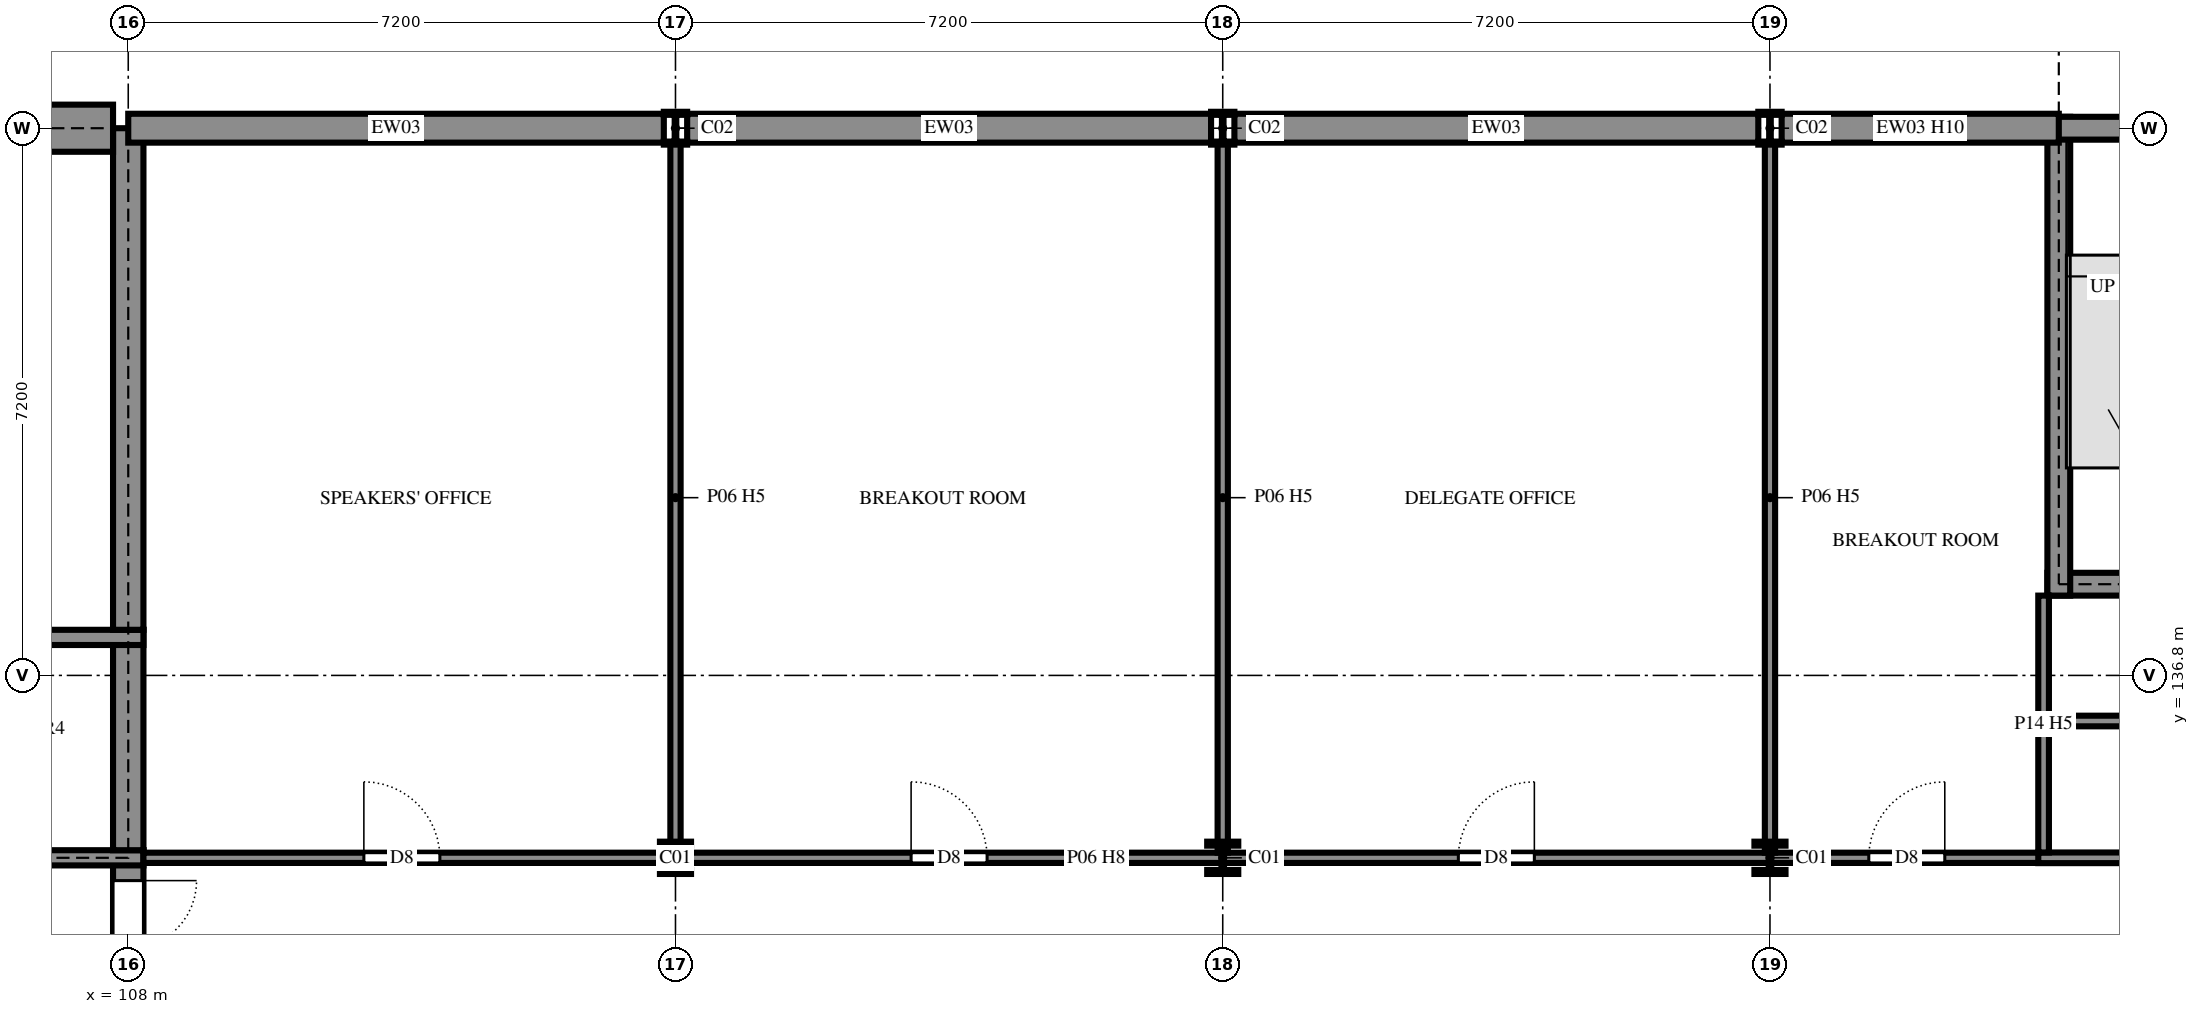
"""IFC4 building model, lengths in metres.
Left out: names, types, materials, properties, quantities, classifications, styles, units other than length and angle.
Written with IfcOpenShell. Run it as: python <this file> out.ifc"""

import sys

from ifc_helpers import new_model, si_unit, direction, frame, frame_2d, origin, origin_2d, place, context, subcontext, project, spatial, rectangle, i_section, extrude, element, fill, save


model = new_model("IFC4")
c1 = context("Model", 3, precision=1e-05, world=origin(), true_north=direction((0.0, 1.0)))
c2 = subcontext(c1, "Body", "Model", "MODEL_VIEW")
j1 = project(units=[si_unit("LENGTHUNIT", "METRE"), si_unit("PLANEANGLEUNIT", "RADIAN")], contexts=[c1])
p1 = place(None, origin())
s1 = spatial("IfcSite", under=j1, at=p1, CompositionType="ELEMENT")
p2 = place(p1, origin())
s2 = spatial("IfcBuilding", under=s1, at=p2, CompositionType="ELEMENT")
p3 = place(p2, frame((0.0, 0.0, 14.4)))
s3 = spatial("IfcBuildingStorey", under=s2, at=p3, CompositionType="ELEMENT", Elevation=14.4)
p4 = place(p3, frame((115.2, 134.4, 0.0), z_axis=(0.0, 0.0, 1.0), x_axis=(1.0, 0.0, 0.0)))
e1 = element("IfcColumn", 1, at=p4, inside=s3, PredefinedType="COLUMN", context=c2, shape_type="SweptSolid", body=[
    extrude(i_section(OverallWidth=0.409, OverallDepth=0.425, WebThickness=0.033, FlangeThickness=0.052, FilletRadius=0.015, at=origin_2d()), origin(), (0.0, 0.0, 1.0), 3.6),
])
p5 = place(p3, frame((115.2, 144.0, 0.0), z_axis=(0.0, 0.0, 1.0), x_axis=(1.0, 0.0, 0.0)))
e2 = element("IfcColumn", 2, at=p5, inside=s3, PredefinedType="COLUMN", context=c2, shape_type="SweptSolid", body=[
    extrude(i_section(OverallWidth=0.307, OverallDepth=0.432, WebThickness=0.021, FlangeThickness=0.04, FilletRadius=0.027, at=origin_2d()), origin(), (0.0, 0.0, 1.0), 3.6),
])
p6 = place(p3, frame((122.4, 134.4, 0.0), z_axis=(0.0, 0.0, 1.0), x_axis=(1.0, 0.0, 0.0)))
e3 = element("IfcColumn", 3, at=p6, inside=s3, PredefinedType="COLUMN", context=c2, shape_type="SweptSolid", body=[
    extrude(i_section(OverallWidth=0.409, OverallDepth=0.425, WebThickness=0.033, FlangeThickness=0.052, FilletRadius=0.015, at=origin_2d()), origin(), (0.0, 0.0, 1.0), 3.6),
])
p7 = place(p3, frame((122.4, 144.0, 0.0), z_axis=(0.0, 0.0, 1.0), x_axis=(1.0, 0.0, 0.0)))
e4 = element("IfcColumn", 4, at=p7, inside=s3, PredefinedType="COLUMN", context=c2, shape_type="SweptSolid", body=[
    extrude(i_section(OverallWidth=0.307, OverallDepth=0.432, WebThickness=0.021, FlangeThickness=0.04, FilletRadius=0.027, at=origin_2d()), origin(), (0.0, 0.0, 1.0), 3.6),
])
p8 = place(p3, frame((129.6, 134.4, 0.0), z_axis=(0.0, 0.0, 1.0), x_axis=(1.0, 0.0, 0.0)))
e5 = element("IfcColumn", 5, at=p8, inside=s3, PredefinedType="COLUMN", context=c2, shape_type="SweptSolid", body=[
    extrude(i_section(OverallWidth=0.409, OverallDepth=0.425, WebThickness=0.033, FlangeThickness=0.052, FilletRadius=0.015, at=origin_2d()), origin(), (0.0, 0.0, 1.0), 3.6),
])
p9 = place(p3, frame((129.6, 144.0, 0.0), z_axis=(0.0, 0.0, 1.0), x_axis=(1.0, 0.0, 0.0)))
e6 = element("IfcColumn", 6, at=p9, inside=s3, PredefinedType="COLUMN", context=c2, shape_type="SweptSolid", body=[
    extrude(i_section(OverallWidth=0.307, OverallDepth=0.432, WebThickness=0.021, FlangeThickness=0.04, FilletRadius=0.027, at=origin_2d()), origin(), (0.0, 0.0, 1.0), 3.6),
])
p10 = place(p3, frame((108.0, 132.0, 0.0), z_axis=(0.0, 0.0, 1.0), x_axis=(0.0, 1.0, 0.0)))
e7 = element("IfcWall", 7, at=p10, inside=s3, PredefinedType="SHEAR", context=c2, shape_type="SweptSolid", body=[
    extrude(rectangle(XDim=2.5, YDim=0.4, at=frame_2d((1.25, 0.0))), origin(), (0.0, 0.0, 1.0), 3.6),
])
p11 = place(p10, frame((0.3, 0.0, 0.0)))
e8 = element("IfcOpeningElement", 8, at=p11, cuts=e7, PredefinedType="OPENING", context=c2, shape_type="SweptSolid", body=[
    extrude(rectangle(XDim=1.8, YDim=2.1, at=frame_2d((0.9, 1.05))), frame((0.0, 0.21, 0.0), z_axis=(0.0, -1.0, 0.0), x_axis=(1.0, 0.0, 0.0)), (0.0, 0.0, 1.0), 0.42),
])
p12 = place(p3, frame((104.1, 134.4, 0.0), z_axis=(0.0, 0.0, 1.0), x_axis=(1.0, 0.0, 0.0)))
e9 = element("IfcWall", 9, at=p12, inside=s3, PredefinedType="SHEAR", context=c2, shape_type="SweptSolid", body=[
    extrude(rectangle(XDim=4.1, YDim=0.2, at=frame_2d((2.05, 0.0))), origin(), (0.0, 0.0, 1.0), 3.6),
])
p13 = place(p12, frame((1.475, 0.0, 0.0)))
e10 = element("IfcOpeningElement", 10, at=p13, cuts=e9, PredefinedType="OPENING", context=c2, shape_type="SweptSolid", body=[
    extrude(rectangle(XDim=0.85, YDim=2.1, at=frame_2d((0.425, 1.05))), frame((0.0, 0.11, 0.0), z_axis=(0.0, -1.0, 0.0), x_axis=(1.0, 0.0, 0.0)), (0.0, 0.0, 1.0), 0.22),
])
p14 = place(p3, frame((108.0, 134.5, 0.0), z_axis=(0.0, 0.0, 1.0), x_axis=(0.0, 1.0, 0.0)))
e11 = element("IfcWall", 11, at=p14, inside=s3, PredefinedType="SHEAR", context=c2, shape_type="SweptSolid", body=[
    extrude(rectangle(XDim=2.9, YDim=0.4, at=frame_2d((1.45, 0.0))), origin(), (0.0, 0.0, 1.0), 3.6),
])
p15 = place(p3, frame((108.2, 137.3, 0.0), z_axis=(0.0, 0.0, 1.0), x_axis=(-1.0, 0.0, 0.0)))
e12 = element("IfcWall", 12, at=p15, inside=s3, PredefinedType="SHEAR", context=c2, shape_type="SweptSolid", body=[
    extrude(rectangle(XDim=4.1, YDim=0.2, at=frame_2d((2.05, 0.0))), origin(), (0.0, 0.0, 1.0), 3.6),
])
p16 = place(p3, frame((108.0, 137.4, 0.0), z_axis=(0.0, 0.0, 1.0), x_axis=(0.0, 1.0, 0.0)))
e13 = element("IfcWall", 13, at=p16, inside=s3, PredefinedType="SHEAR", context=c2, shape_type="SweptSolid", body=[
    extrude(rectangle(XDim=6.6, YDim=0.4, at=frame_2d((3.3, 0.0))), origin(), (0.0, 0.0, 1.0), 3.6),
])
p17 = place(p3, frame((133.25, 138.0, 0.0), z_axis=(0.0, 0.0, 1.0), x_axis=(1.0, 0.0, 0.0)))
e14 = element("IfcWall", 14, at=p17, inside=s3, PredefinedType="SHEAR", context=c2, shape_type="SweptSolid", body=[
    extrude(rectangle(XDim=3.7, YDim=0.3, at=frame_2d((1.85, 0.0))), origin(), (0.0, 0.0, 1.0), 3.6),
])
p18 = place(p17, frame((1.25, 0.0, 0.0)))
e15 = element("IfcOpeningElement", 15, at=p18, cuts=e14, PredefinedType="OPENING", context=c2, shape_type="SweptSolid", body=[
    extrude(rectangle(XDim=1.0, YDim=2.1, at=frame_2d((0.5, 1.05))), frame((0.0, 0.16, 0.0), z_axis=(0.0, -1.0, 0.0), x_axis=(1.0, 0.0, 0.0)), (0.0, 0.0, 1.0), 0.32),
])
p19 = place(p3, frame((133.4, 144.15, 0.0), z_axis=(0.0, 0.0, 1.0), x_axis=(0.0, -1.0, 0.0)))
e16 = element("IfcWall", 16, at=p19, inside=s3, PredefinedType="SHEAR", context=c2, shape_type="SweptSolid", body=[
    extrude(rectangle(XDim=6.3, YDim=0.3, at=frame_2d((3.15, 0.0))), origin(), (0.0, 0.0, 1.0), 3.6),
])
p20 = place(p3, frame((136.95, 144.0, 0.0), z_axis=(0.0, 0.0, 1.0), x_axis=(-1.0, 0.0, 0.0)))
e17 = element("IfcWall", 17, at=p20, inside=s3, PredefinedType="SHEAR", context=c2, shape_type="SweptSolid", body=[
    extrude(rectangle(XDim=3.7, YDim=0.3, at=frame_2d((1.85, 0.0))), origin(), (0.0, 0.0, 1.0), 3.6),
])
p21 = place(p20, frame((1.25, 0.0, 0.6)))
e18 = element("IfcOpeningElement", 18, at=p21, cuts=e17, PredefinedType="OPENING", context=c2, shape_type="SweptSolid", body=[
    extrude(rectangle(XDim=0.9, YDim=2.1, at=frame_2d((0.45, 1.05))), frame((0.0, 0.16, 0.0), z_axis=(0.0, -1.0, 0.0), x_axis=(1.0, 0.0, 0.0)), (0.0, 0.0, 1.0), 0.32),
])
p22 = place(p3, frame((133.4, 144.0, 0.0), z_axis=(0.0, 0.0, 1.0), x_axis=(-1.0, 0.0, 0.0)))
e19 = element("IfcWall", 19, at=p22, inside=s3, PredefinedType="SOLIDWALL", context=c2, shape_type="SweptSolid", body=[
    extrude(rectangle(XDim=3.646, YDim=0.38, at=frame_2d((1.823, 0.0))), origin(), (0.0, 0.0, 1.0), 3.26),
])
for number, where, z_axis, x_axis in (
    (20, (129.447, 144.0, 0.0), (0.0, 0.0, 1.0), (-1.0, 0.0, 0.0)),
    (21, (122.247, 144.0, 0.0), (0.0, 0.0, 1.0), (-1.0, 0.0, 0.0)),
):
    element("IfcWall", number, at=place(p3, frame(where, z_axis=z_axis, x_axis=x_axis)), inside=s3, PredefinedType="SOLIDWALL", context=c2, shape_type="SweptSolid", body=[
        extrude(rectangle(XDim=6.893, YDim=0.38, at=frame_2d((3.447, 0.0))), origin(), (0.0, 0.0, 1.0), 3.16),
    ])
p23 = place(p3, frame((115.046, 144.0, 0.0), z_axis=(0.0, 0.0, 1.0), x_axis=(-1.0, 0.0, 0.0)))
e22 = element("IfcWall", 22, at=p23, inside=s3, PredefinedType="SOLIDWALL", context=c2, shape_type="SweptSolid", body=[
    extrude(rectangle(XDim=7.046, YDim=0.38, at=frame_2d((3.523, 0.0))), origin(), (0.0, 0.0, 1.0), 3.16),
])
p24 = place(p3, frame((107.8, 144.0, 0.0), z_axis=(0.0, 0.0, 1.0), x_axis=(-1.0, 0.0, 0.0)))
e23 = element("IfcWall", 23, at=p24, inside=s3, PredefinedType="SOLIDWALL", context=c2, shape_type="SweptSolid", body=[
    extrude(rectangle(XDim=1.2, YDim=0.62, at=frame_2d((0.6, 0.0))), origin(), (0.0, 0.0, 1.0), 3.46),
])
p25 = place(p3, frame((108.2, 134.4, 0.0), z_axis=(0.0, 0.0, 1.0), x_axis=(1.0, 0.0, 0.0)))
e24 = element("IfcWall", 24, at=p25, inside=s3, PredefinedType="PARTITIONING", context=c2, shape_type="SweptSolid", body=[
    extrude(rectangle(XDim=25.07, YDim=0.135, at=frame_2d((12.535, 0.0))), origin(), (0.0, 0.0, 1.0), 3.16),
])
p26 = place(p25, frame((2.9, 0.0, 0.0)))
e25 = element("IfcOpeningElement", 25, at=p26, cuts=e24, PredefinedType="OPENING", context=c2, shape_type="SweptSolid", body=[
    extrude(rectangle(XDim=1.0, YDim=2.4, at=frame_2d((0.5, 1.2))), frame((0.0, 0.077, 0.0), z_axis=(0.0, -1.0, 0.0), x_axis=(1.0, 0.0, 0.0)), (0.0, 0.0, 1.0), 0.155),
])
p27 = place(p25, frame((10.1, 0.0, 0.0)))
e26 = element("IfcOpeningElement", 26, at=p27, cuts=e24, PredefinedType="OPENING", context=c2, shape_type="SweptSolid", body=[
    extrude(rectangle(XDim=1.0, YDim=2.4, at=frame_2d((0.5, 1.2))), frame((0.0, 0.077, 0.0), z_axis=(0.0, -1.0, 0.0), x_axis=(1.0, 0.0, 0.0)), (0.0, 0.0, 1.0), 0.155),
])
p28 = place(p25, frame((17.3, 0.0, 0.0)))
e27 = element("IfcOpeningElement", 27, at=p28, cuts=e24, PredefinedType="OPENING", context=c2, shape_type="SweptSolid", body=[
    extrude(rectangle(XDim=1.0, YDim=2.4, at=frame_2d((0.5, 1.2))), frame((0.0, 0.077, 0.0), z_axis=(0.0, -1.0, 0.0), x_axis=(1.0, 0.0, 0.0)), (0.0, 0.0, 1.0), 0.155),
])
p29 = place(p25, frame((22.7, 0.0, 0.0)))
e28 = element("IfcOpeningElement", 28, at=p29, cuts=e24, PredefinedType="OPENING", context=c2, shape_type="SweptSolid", body=[
    extrude(rectangle(XDim=1.0, YDim=2.4, at=frame_2d((0.5, 1.2))), frame((0.0, 0.077, 0.0), z_axis=(0.0, -1.0, 0.0), x_axis=(1.0, 0.0, 0.0)), (0.0, 0.0, 1.0), 0.155),
])
p30 = place(p3, frame((133.13, 134.4, 0.0), z_axis=(0.0, 0.0, 1.0), x_axis=(1.0, 0.0, 0.0)))
e29 = element("IfcWall", 29, at=p30, inside=s3, PredefinedType="PARTITIONING", context=c2, shape_type="SweptSolid", body=[
    extrude(rectangle(XDim=3.48, YDim=0.14, at=frame_2d((1.74, 0.0))), origin(), (0.0, 0.0, 1.0), 3.16),
])
p31 = place(p30, frame((1.37, 0.0, 0.0)))
e30 = element("IfcOpeningElement", 30, at=p31, cuts=e29, PredefinedType="OPENING", context=c2, shape_type="SweptSolid", body=[
    extrude(rectangle(XDim=1.0, YDim=2.1, at=frame_2d((0.5, 1.05))), frame((0.0, 0.08, 0.0), z_axis=(0.0, -1.0, 0.0), x_axis=(1.0, 0.0, 0.0)), (0.0, 0.0, 1.0), 0.16),
])
p32 = place(p3, frame((133.27, 136.2, 0.0), z_axis=(0.0, 0.0, 1.0), x_axis=(1.0, 0.0, 0.0)))
e31 = element("IfcWall", 31, at=p32, inside=s3, PredefinedType="PARTITIONING", context=c2, shape_type="SweptSolid", body=[
    extrude(rectangle(XDim=3.34, YDim=0.14, at=frame_2d((1.67, 0.0))), origin(), (0.0, 0.0, 1.0), 3.42),
])
p33 = place(p32, frame((1.23, 0.0, 0.0)))
e32 = element("IfcOpeningElement", 32, at=p33, cuts=e31, PredefinedType="OPENING", context=c2, shape_type="SweptSolid", body=[
    extrude(rectangle(XDim=1.0, YDim=2.1, at=frame_2d((0.5, 1.05))), frame((0.0, 0.08, 0.0), z_axis=(0.0, -1.0, 0.0), x_axis=(1.0, 0.0, 0.0)), (0.0, 0.0, 1.0), 0.16),
])
for number, where, z_axis, x_axis in (
    (33, (115.2, 134.468, 0.0), (0.0, 0.0, 1.0), (0.0, 1.0, 0.0)),
    (34, (122.4, 134.468, 0.0), (0.0, 0.0, 1.0), (0.0, 1.0, 0.0)),
    (35, (129.6, 134.468, 0.0), (0.0, 0.0, 1.0), (0.0, 1.0, 0.0)),
):
    element("IfcWall", number, at=place(p3, frame(where, z_axis=z_axis, x_axis=x_axis)), inside=s3, PredefinedType="PARTITIONING", context=c2, shape_type="SweptSolid", body=[
        extrude(rectangle(XDim=9.343, YDim=0.135, at=frame_2d((4.671, 0.0))), origin(), (0.0, 0.0, 1.0), 3.06),
    ])
p34 = place(p3, frame((133.2, 134.47, 0.0), z_axis=(0.0, 0.0, 1.0), x_axis=(0.0, 1.0, 0.0)))
e36 = element("IfcWall", 36, at=p34, inside=s3, PredefinedType="PARTITIONING", context=c2, shape_type="SweptSolid", body=[
    extrude(rectangle(XDim=3.38, YDim=0.14, at=frame_2d((1.69, 0.0))), origin(), (0.0, 0.0, 1.0), 3.06),
])
p35 = place(p26, origin())
e37 = element("IfcDoor", 37, at=p35, inside=s3, OperationType="SINGLE_SWING_RIGHT", PredefinedType="DOOR", context=c2, shape_type="SweptSolid", body=[
    extrude(rectangle(XDim=1.0, YDim=2.4, at=frame_2d((0.5, 1.2))), frame((0.0, 0.025, 0.0), z_axis=(0.0, -1.0, 0.0), x_axis=(1.0, 0.0, 0.0)), (0.0, 0.0, 1.0), 0.05),
])
fill(e25, e37)
p36 = place(p27, origin())
e38 = element("IfcDoor", 38, at=p36, inside=s3, OperationType="SINGLE_SWING_RIGHT", PredefinedType="DOOR", context=c2, shape_type="SweptSolid", body=[
    extrude(rectangle(XDim=1.0, YDim=2.4, at=frame_2d((0.5, 1.2))), frame((0.0, 0.025, 0.0), z_axis=(0.0, -1.0, 0.0), x_axis=(1.0, 0.0, 0.0)), (0.0, 0.0, 1.0), 0.05),
])
fill(e26, e38)
p37 = place(p28, origin())
e39 = element("IfcDoor", 39, at=p37, inside=s3, OperationType="SINGLE_SWING_LEFT", PredefinedType="DOOR", context=c2, shape_type="SweptSolid", body=[
    extrude(rectangle(XDim=1.0, YDim=2.4, at=frame_2d((0.5, 1.2))), frame((0.0, 0.025, 0.0), z_axis=(0.0, -1.0, 0.0), x_axis=(1.0, 0.0, 0.0)), (0.0, 0.0, 1.0), 0.05),
])
fill(e27, e39)
p38 = place(p29, origin())
e40 = element("IfcDoor", 40, at=p38, inside=s3, OperationType="SINGLE_SWING_LEFT", PredefinedType="DOOR", context=c2, shape_type="SweptSolid", body=[
    extrude(rectangle(XDim=1.0, YDim=2.4, at=frame_2d((0.5, 1.2))), frame((0.0, 0.025, 0.0), z_axis=(0.0, -1.0, 0.0), x_axis=(1.0, 0.0, 0.0)), (0.0, 0.0, 1.0), 0.05),
])
fill(e28, e40)
p39 = place(p11, frame((1.8, 0.0, 0.0), z_axis=(0.0, 0.0, 1.0), x_axis=(-1.0, 0.0, 0.0)))
e41 = element("IfcDoor", 41, at=p39, inside=s3, OperationType="DOUBLE_DOOR_SINGLE_SWING", PredefinedType="DOOR", context=c2, shape_type="SweptSolid", body=[
    extrude(rectangle(XDim=1.8, YDim=2.1, at=frame_2d((0.9, 1.05))), frame((0.0, 0.025, 0.0), z_axis=(0.0, -1.0, 0.0), x_axis=(1.0, 0.0, 0.0)), (0.0, 0.0, 1.0), 0.05),
])
fill(e8, e41)
save(model, sys.argv[1])
